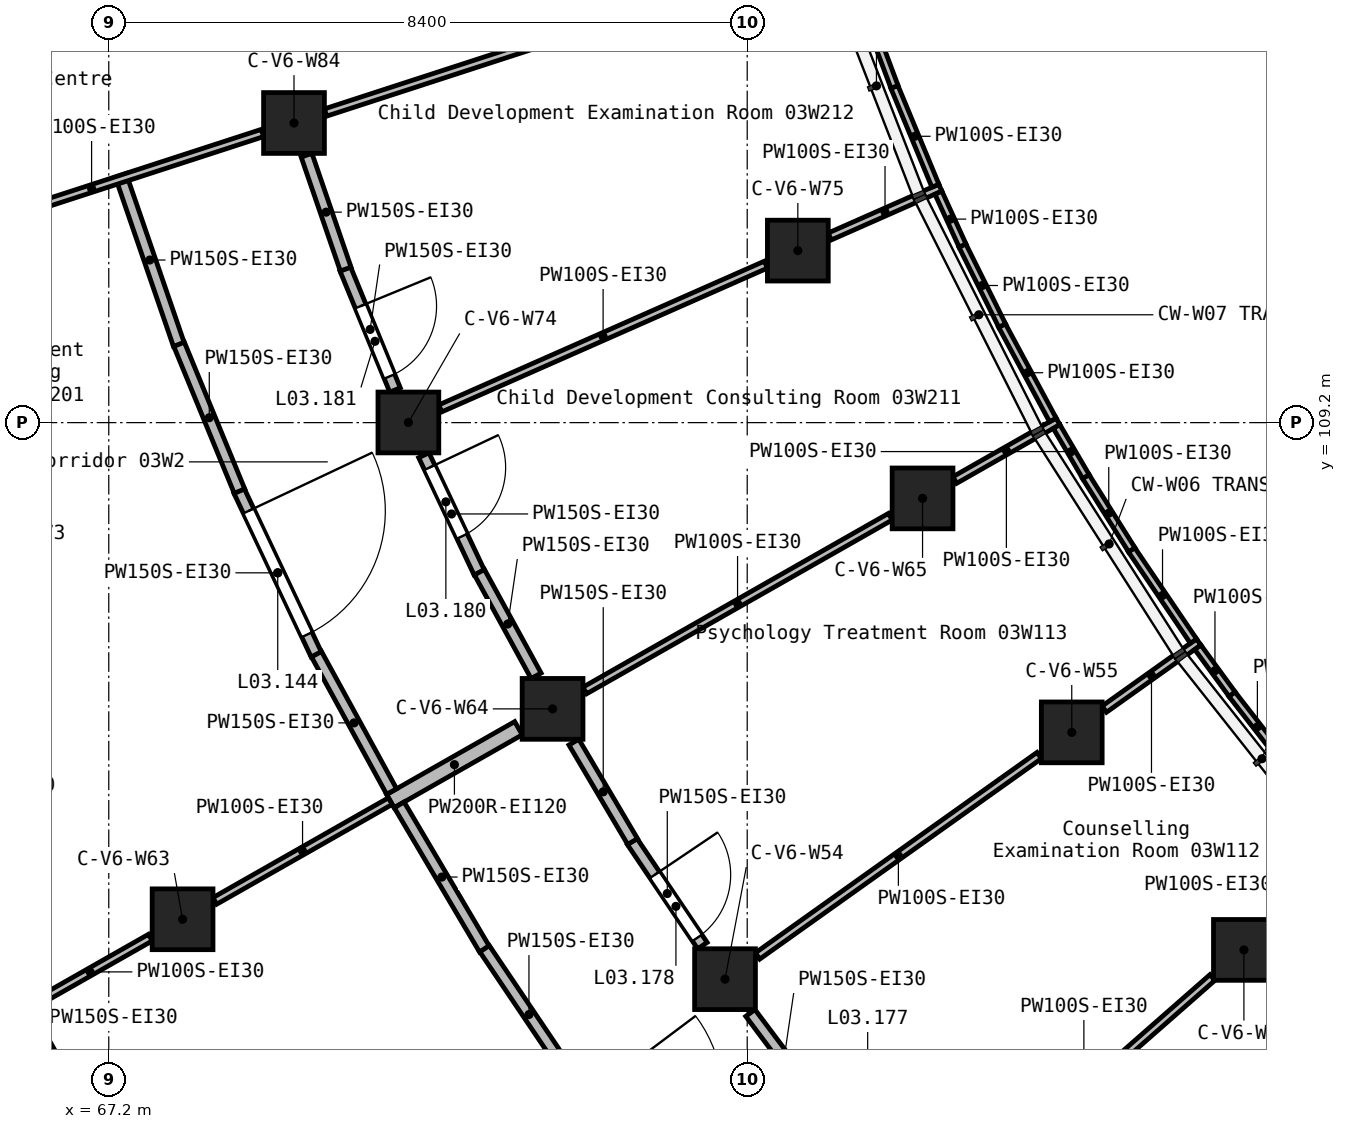
"""IFC4 building model, lengths in metres.
Left out: names, types, materials, properties, quantities, classifications, styles, units other than length and angle.
Written with IfcOpenShell. Run it as: python <this file> out.ifc"""

import sys

from ifc_helpers import new_model, si_unit, direction, frame, frame_2d, origin, origin_2d, place, context, subcontext, project, spatial, rectangle, extrude, element, fill, save


model = new_model("IFC4")
c1 = context("Model", 3, precision=1e-05, world=origin(), true_north=direction((0.0, 1.0)))
c2 = subcontext(c1, "Body", "Model", "MODEL_VIEW")
j1 = project(units=[si_unit("LENGTHUNIT", "METRE"), si_unit("PLANEANGLEUNIT", "RADIAN")], contexts=[c1])
p1 = place(None, origin())
s1 = spatial("IfcSite", under=j1, at=p1, CompositionType="ELEMENT")
p2 = place(p1, origin())
s2 = spatial("IfcBuilding", under=s1, at=p2, CompositionType="ELEMENT")
p3 = place(p2, frame((0.0, 0.0, 16.8)))
s3 = spatial("IfcBuildingStorey", under=s2, at=p3, CompositionType="ELEMENT", Elevation=16.8)
for number, where, z_axis, x_axis in (
    (1, (68.171, 102.666, 0.0), (0.0, 0.0, 1.0), (1.0, 0.0, 0.0)),
    (2, (69.637, 113.142, 0.0), (0.0, 0.0, 1.0), (1.0, 0.0, 0.0)),
    (3, (71.142, 109.202, 0.0), (0.0, 0.0, 1.0), (1.0, 0.0, 0.0)),
    (4, (73.039, 105.434, 0.0), (0.0, 0.0, 1.0), (1.0, 0.0, 0.0)),
    (5, (75.308, 101.878, 0.0), (0.0, 0.0, 1.0), (1.0, 0.0, 0.0)),
    (6, (76.266, 111.463, 0.0), (0.0, 0.0, 1.0), (1.0, 0.0, 0.0)),
    (7, (77.907, 108.203, 0.0), (0.0, 0.0, 1.0), (1.0, 0.0, 0.0)),
    (8, (79.87, 105.125, 0.0), (0.0, 0.0, 1.0), (1.0, 0.0, 0.0)),
    (9, (82.135, 102.263, 0.0), (0.0, 0.0, 1.0), (1.0, 0.0, 0.0)),
):
    element("IfcColumn", number, at=place(p3, frame(where, z_axis=z_axis, x_axis=x_axis)), inside=s3, PredefinedType="COLUMN", context=c2, shape_type="SweptSolid", body=[
        extrude(rectangle(XDim=0.8, YDim=0.8, at=origin_2d()), origin(), (0.0, 0.0, 1.0), 4.2),
    ])
p4 = place(p3, frame((70.905, 104.221, 0.0), z_axis=(0.0, 0.0, 1.0), x_axis=(0.869256176146, 0.494361912198, 0.0)))
e10 = element("IfcWall", 10, at=p4, inside=s3, PredefinedType="SOLIDWALL", context=c2, shape_type="SweptSolid", body=[
    extrude(rectangle(XDim=1.939, YDim=0.2, at=frame_2d((0.97, 0.0))), origin(), (0.0, 0.0, 1.0), 3.9),
])
p5 = place(p3, frame((68.915, 108.301, 0.0), z_axis=(0.0, 0.0, 1.0), x_axis=(0.426631335289, -0.904425620905, 0.0)))
e11 = element("IfcWall", 11, at=p5, inside=s3, PredefinedType="PARTITIONING", context=c2, shape_type="SweptSolid", body=[
    extrude(rectangle(XDim=2.381, YDim=0.15, at=frame_2d((1.19, 0.0))), origin(), (0.0, 0.0, 1.0), 3.9),
])
p6 = place(p5, frame((0.291, 0.0, 0.0)))
e12 = element("IfcOpeningElement", 12, at=p6, cuts=e11, PredefinedType="OPENING", context=c2, shape_type="SweptSolid", body=[
    extrude(rectangle(XDim=1.8, YDim=2.1, at=frame_2d((0.9, 1.05))), frame((0.0, 0.085, 0.0), z_axis=(0.0, -1.0, 0.0), x_axis=(1.0, 0.0, 0.0)), (0.0, 0.0, 1.0), 0.17),
])
p7 = place(p3, frame((71.021, 104.171, 0.0), z_axis=(0.0, 0.0, 1.0), x_axis=(0.50873677225, -0.860922119916, 0.0)))
e13 = element("IfcWall", 13, at=p7, inside=s3, PredefinedType="PARTITIONING", context=c2, shape_type="SweptSolid", body=[
    extrude(rectangle(XDim=2.205, YDim=0.15, at=frame_2d((1.103, 0.0))), origin(), (0.0, 0.0, 1.0), 3.9),
])
p8 = place(p3, frame((67.357, 112.453, 0.0), z_axis=(0.0, 0.0, 1.0), x_axis=(0.32494944972, -0.94573138635, 0.0)))
e14 = element("IfcWall", 14, at=p8, inside=s3, PredefinedType="PARTITIONING", context=c2, shape_type="SweptSolid", body=[
    extrude(rectangle(XDim=2.356, YDim=0.15, at=frame_2d((1.178, 0.0))), origin(), (0.0, 0.0, 1.0), 3.9),
])
p9 = place(p3, frame((72.145, 102.278, 0.0), z_axis=(0.0, 0.0, 1.0), x_axis=(0.558900636953, -0.829234633873, 0.0)))
e15 = element("IfcWall", 15, at=p9, inside=s3, PredefinedType="PARTITIONING", context=c2, shape_type="SweptSolid", body=[
    extrude(rectangle(XDim=2.089, YDim=0.15, at=frame_2d((1.044, 0.0))), origin(), (0.0, 0.0, 1.0), 3.9),
])
p10 = place(p3, frame((69.933, 106.153, 0.0), z_axis=(0.0, 0.0, 1.0), x_axis=(0.479964929401, -0.877287676047, 0.0)))
e16 = element("IfcWall", 16, at=p10, inside=s3, PredefinedType="PARTITIONING", context=c2, shape_type="SweptSolid", body=[
    extrude(rectangle(XDim=2.059, YDim=0.15, at=frame_2d((1.03, 0.0))), origin(), (0.0, 0.0, 1.0), 3.9),
])
p11 = place(p3, frame((68.125, 110.231, 0.0), z_axis=(0.0, 0.0, 1.0), x_axis=(0.38056168262, -0.924755538357, 0.0)))
e17 = element("IfcWall", 17, at=p11, inside=s3, PredefinedType="PARTITIONING", context=c2, shape_type="SweptSolid", body=[
    extrude(rectangle(XDim=2.089, YDim=0.15, at=frame_2d((1.044, 0.0))), origin(), (0.0, 0.0, 1.0), 3.9),
])
p12 = place(p3, frame((74.086, 103.69, 0.0), z_axis=(0.0, 0.0, 1.0), x_axis=(0.558985889655, -0.829177167538, 0.0)))
e18 = element("IfcWall", 18, at=p12, inside=s3, PredefinedType="PARTITIONING", context=c2, shape_type="SweptSolid", body=[
    extrude(rectangle(XDim=1.654, YDim=0.15, at=frame_2d((0.827, 0.0))), origin(), (0.0, 0.0, 1.0), 3.9),
])
p13 = place(p12, frame((0.53, 0.0, 0.0)))
e19 = element("IfcOpeningElement", 19, at=p13, cuts=e18, PredefinedType="OPENING", context=c2, shape_type="SweptSolid", body=[
    extrude(rectangle(XDim=1.0, YDim=2.1, at=frame_2d((0.5, 1.05))), frame((0.0, 0.085, 0.0), z_axis=(0.0, -1.0, 0.0), x_axis=(1.0, 0.0, 0.0)), (0.0, 0.0, 1.0), 0.17),
])
p14 = place(p3, frame((71.346, 108.771, 0.0), z_axis=(0.0, 0.0, 1.0), x_axis=(0.42702903496, -0.904237912997, 0.0)))
e20 = element("IfcWall", 20, at=p14, inside=s3, PredefinedType="PARTITIONING", context=c2, shape_type="SweptSolid", body=[
    extrude(rectangle(XDim=1.708, YDim=0.15, at=frame_2d((0.854, 0.0))), origin(), (0.0, 0.0, 1.0), 3.9),
])
p15 = place(p14, frame((0.178, 0.0, 0.0)))
e21 = element("IfcOpeningElement", 21, at=p15, cuts=e20, PredefinedType="OPENING", context=c2, shape_type="SweptSolid", body=[
    extrude(rectangle(XDim=1.0, YDim=2.1, at=frame_2d((0.5, 1.05))), frame((0.0, 0.085, 0.0), z_axis=(0.0, -1.0, 0.0), x_axis=(1.0, 0.0, 0.0)), (0.0, 0.0, 1.0), 0.17),
])
p16 = place(p3, frame((70.312, 111.222, 0.0), z_axis=(0.0, 0.0, 1.0), x_axis=(0.380150665177, -0.924924576258, 0.0)))
e22 = element("IfcWall", 22, at=p16, inside=s3, PredefinedType="PARTITIONING", context=c2, shape_type="SweptSolid", body=[
    extrude(rectangle(XDim=1.722, YDim=0.15, at=frame_2d((0.861, 0.0))), origin(), (0.0, 0.0, 1.0), 3.9),
])
p17 = place(p16, frame((0.53, 0.0, 0.0)))
e23 = element("IfcOpeningElement", 23, at=p17, cuts=e22, PredefinedType="OPENING", context=c2, shape_type="SweptSolid", body=[
    extrude(rectangle(XDim=1.0, YDim=2.1, at=frame_2d((0.5, 1.05))), frame((0.0, 0.085, 0.0), z_axis=(0.0, -1.0, 0.0), x_axis=(1.0, 0.0, 0.0)), (0.0, 0.0, 1.0), 0.17),
])
p18 = place(p3, frame((73.319, 104.997, 0.0), z_axis=(0.0, 0.0, 1.0), x_axis=(0.508740142918, -0.86092012811, 0.0)))
e24 = element("IfcWall", 24, at=p18, inside=s3, PredefinedType="PARTITIONING", context=c2, shape_type="SweptSolid", body=[
    extrude(rectangle(XDim=1.519, YDim=0.15, at=frame_2d((0.759, 0.0))), origin(), (0.0, 0.0, 1.0), 3.9),
])
p19 = place(p3, frame((75.641, 101.434, 0.0), z_axis=(0.0, 0.0, 1.0), x_axis=(0.60023710435, -0.799822116825, 0.0)))
e25 = element("IfcWall", 25, at=p19, inside=s3, PredefinedType="PARTITIONING", context=c2, shape_type="SweptSolid", body=[
    extrude(rectangle(XDim=1.483, YDim=0.15, at=frame_2d((0.741, 0.0))), origin(), (0.0, 0.0, 1.0), 3.9),
])
p20 = place(p3, frame((72.077, 107.232, 0.0), z_axis=(0.0, 0.0, 1.0), x_axis=(0.480041086357, -0.877246006209, 0.0)))
e26 = element("IfcWall", 26, at=p20, inside=s3, PredefinedType="PARTITIONING", context=c2, shape_type="SweptSolid", body=[
    extrude(rectangle(XDim=1.553, YDim=0.15, at=frame_2d((0.777, 0.0))), origin(), (0.0, 0.0, 1.0), 3.9),
])
p21 = place(p3, frame((69.802, 112.718, 0.0), z_axis=(0.0, 0.0, 1.0), x_axis=(0.32490745983, -0.945745812863, 0.0)))
e27 = element("IfcWall", 27, at=p21, inside=s3, PredefinedType="PARTITIONING", context=c2, shape_type="SweptSolid", body=[
    extrude(rectangle(XDim=1.584, YDim=0.15, at=frame_2d((0.792, 0.0))), origin(), (0.0, 0.0, 1.0), 3.9),
])
p22 = place(p3, frame((65.655, 102.257, 0.0), z_axis=(0.0, 0.0, 1.0), x_axis=(0.495741714706, -0.868470006564, 0.0)))
e28 = element("IfcWall", 28, at=p22, inside=s3, PredefinedType="PARTITIONING", context=c2, shape_type="SweptSolid", body=[
    extrude(rectangle(XDim=2.052, YDim=0.15, at=frame_2d((1.026, 0.0))), origin(), (0.0, 0.0, 1.0), 3.9),
])
p23 = place(p3, frame((64.726, 111.55, 0.0), z_axis=(0.0, 0.0, 1.0), x_axis=(0.951062529891, 0.308998485818, 0.0)))
e29 = element("IfcWall", 29, at=p23, inside=s3, PredefinedType="PARTITIONING", context=c2, shape_type="SweptSolid", body=[
    extrude(rectangle(XDim=4.727, YDim=0.1, at=frame_2d((2.364, 0.0))), origin(), (0.0, 0.0, 1.0), 3.9),
])
p24 = place(p3, frame((70.052, 113.28, 0.0), z_axis=(0.0, 0.0, 1.0), x_axis=(0.951069136727, 0.308978149982, 0.0)))
e30 = element("IfcWall", 30, at=p24, inside=s3, PredefinedType="PARTITIONING", context=c2, shape_type="SweptSolid", body=[
    extrude(rectangle(XDim=7.213, YDim=0.1, at=frame_2d((3.606, 0.0))), origin(), (0.0, 0.0, 1.0), 3.9),
])
p25 = place(p3, frame((71.562, 109.387, 0.0), z_axis=(0.0, 0.0, 1.0), x_axis=(0.914844742968, 0.403805765515, 0.0)))
e31 = element("IfcWall", 31, at=p25, inside=s3, PredefinedType="PARTITIONING", context=c2, shape_type="SweptSolid", body=[
    extrude(rectangle(XDim=4.683, YDim=0.1, at=frame_2d((2.342, 0.0))), origin(), (0.0, 0.0, 1.0), 3.9),
])
p26 = place(p3, frame((76.686, 111.649, 0.0), z_axis=(0.0, 0.0, 1.0), x_axis=(0.914802710669, 0.403900978649, 0.0)))
e32 = element("IfcWall", 32, at=p26, inside=s3, PredefinedType="PARTITIONING", context=c2, shape_type="SweptSolid", body=[
    extrude(rectangle(XDim=1.59, YDim=0.1, at=frame_2d((0.795, 0.0))), origin(), (0.0, 0.0, 1.0), 3.9),
])
p27 = place(p3, frame((78.338, 98.933, 0.0), z_axis=(0.0, 0.0, 1.0), x_axis=(0.751823288541, 0.659364650863, 0.0)))
e33 = element("IfcWall", 33, at=p27, inside=s3, PredefinedType="PARTITIONING", context=c2, shape_type="SweptSolid", body=[
    extrude(rectangle(XDim=4.5, YDim=0.1, at=frame_2d((2.25, 0.0))), origin(), (0.0, 0.0, 1.0), 3.9),
])
p28 = place(p3, frame((75.736, 102.183, 0.0), z_axis=(0.0, 0.0, 1.0), x_axis=(0.8147152487, 0.579861245072, 0.0)))
e34 = element("IfcWall", 34, at=p28, inside=s3, PredefinedType="PARTITIONING", context=c2, shape_type="SweptSolid", body=[
    extrude(rectangle(XDim=4.548, YDim=0.1, at=frame_2d((2.274, 0.0))), origin(), (0.0, 0.0, 1.0), 3.9),
])
p29 = place(p3, frame((80.298, 105.43, 0.0), z_axis=(0.0, 0.0, 1.0), x_axis=(0.814728250396, 0.579842977027, 0.0)))
e35 = element("IfcWall", 35, at=p29, inside=s3, PredefinedType="PARTITIONING", context=c2, shape_type="SweptSolid", body=[
    extrude(rectangle(XDim=1.524, YDim=0.1, at=frame_2d((0.762, 0.0))), origin(), (0.0, 0.0, 1.0), 3.9),
])
p30 = place(p3, frame((73.463, 105.676, 0.0), z_axis=(0.0, 0.0, 1.0), x_axis=(0.8692549769, 0.494364020874, 0.0)))
e36 = element("IfcWall", 36, at=p30, inside=s3, PredefinedType="PARTITIONING", context=c2, shape_type="SweptSolid", body=[
    extrude(rectangle(XDim=4.625, YDim=0.1, at=frame_2d((2.312, 0.0))), origin(), (0.0, 0.0, 1.0), 3.9),
])
p31 = place(p3, frame((78.331, 108.445, 0.0), z_axis=(0.0, 0.0, 1.0), x_axis=(0.869222922884, 0.494420378154, 0.0)))
e37 = element("IfcWall", 37, at=p31, inside=s3, PredefinedType="PARTITIONING", context=c2, shape_type="SweptSolid", body=[
    extrude(rectangle(XDim=1.561, YDim=0.1, at=frame_2d((0.781, 0.0))), origin(), (0.0, 0.0, 1.0), 3.9),
])
p32 = place(p3, frame((66.16, 101.523, 0.0), z_axis=(0.0, 0.0, 1.0), x_axis=(0.869286737545, 0.494308171011, 0.0)))
e38 = element("IfcWall", 38, at=p32, inside=s3, PredefinedType="PARTITIONING", context=c2, shape_type="SweptSolid", body=[
    extrude(rectangle(XDim=1.825, YDim=0.1, at=frame_2d((0.913, 0.0))), origin(), (0.0, 0.0, 1.0), 3.9),
])
p33 = place(p3, frame((68.595, 102.907, 0.0), z_axis=(0.0, 0.0, 1.0), x_axis=(0.869270757215, 0.494336272846, 0.0)))
e39 = element("IfcWall", 39, at=p33, inside=s3, PredefinedType="PARTITIONING", context=c2, shape_type="SweptSolid", body=[
    extrude(rectangle(XDim=2.656, YDim=0.1, at=frame_2d((1.328, 0.0))), origin(), (0.0, 0.0, 1.0), 3.9),
])
p34 = place(p3, frame((80.657, 107.527, 0.0), z_axis=(0.0, 0.0, 1.0), x_axis=(0.561086061718, -0.827757471332, 0.0)))
e40 = element("IfcWall", 40, at=p34, inside=s3, PredefinedType="PARTITIONING", context=c2, shape_type="SweptSolid", body=[
    extrude(rectangle(XDim=1.452, YDim=0.1, at=frame_2d((0.726, 0.0))), origin(), (0.0, 0.0, 1.0), 3.9),
])
p35 = place(p3, frame((78.952, 110.478, 0.0), z_axis=(0.0, 0.0, 1.0), x_axis=(0.474192635092, -0.880421117889, 0.0)))
e41 = element("IfcWall", 41, at=p35, inside=s3, PredefinedType="PARTITIONING", context=c2, shape_type="SweptSolid", body=[
    extrude(rectangle(XDim=1.412, YDim=0.1, at=frame_2d((0.706, 0.0))), origin(), (0.0, 0.0, 1.0), 3.9),
])
p36 = place(p3, frame((77.536, 113.618, 0.0), z_axis=(0.0, 0.0, 1.0), x_axis=(0.383274532271, -0.923634469318, 0.0)))
e42 = element("IfcWall", 42, at=p36, inside=s3, PredefinedType="PARTITIONING", context=c2, shape_type="SweptSolid", body=[
    extrude(rectangle(XDim=1.41, YDim=0.1, at=frame_2d((0.705, 0.0))), origin(), (0.0, 0.0, 1.0), 3.9),
])
p37 = place(p3, frame((77.132, 114.701, 0.0), z_axis=(0.0, 0.0, 1.0), x_axis=(0.350822880831, -0.936441832836, 0.0)))
e43 = element("IfcWall", 43, at=p37, inside=s3, PredefinedType="PARTITIONING", context=c2, shape_type="SweptSolid", body=[
    extrude(rectangle(XDim=1.157, YDim=0.1, at=frame_2d((0.579, 0.0))), origin(), (0.0, 0.0, 1.0), 3.9),
])
p38 = place(p3, frame((78.431, 111.531, 0.0), z_axis=(0.0, 0.0, 1.0), x_axis=(0.445137160255, -0.8954623993, 0.0)))
e44 = element("IfcWall", 44, at=p38, inside=s3, PredefinedType="PARTITIONING", context=c2, shape_type="SweptSolid", body=[
    extrude(rectangle(XDim=1.177, YDim=0.1, at=frame_2d((0.588, 0.0))), origin(), (0.0, 0.0, 1.0), 3.9),
])
p39 = place(p3, frame((80.054, 108.49, 0.0), z_axis=(0.0, 0.0, 1.0), x_axis=(0.531657145883, -0.846959668008, 0.0)))
e45 = element("IfcWall", 45, at=p39, inside=s3, PredefinedType="PARTITIONING", context=c2, shape_type="SweptSolid", body=[
    extrude(rectangle(XDim=1.137, YDim=0.1, at=frame_2d((0.569, 0.0))), origin(), (0.0, 0.0, 1.0), 3.9),
])
p40 = place(p3, frame((81.977, 105.628, 0.0), z_axis=(0.0, 0.0, 1.0), x_axis=(0.61437453726, -0.78901452963, 0.0)))
e46 = element("IfcWall", 46, at=p40, inside=s3, PredefinedType="PARTITIONING", context=c2, shape_type="SweptSolid", body=[
    extrude(rectangle(XDim=1.09, YDim=0.1, at=frame_2d((0.545, 0.0))), origin(), (0.0, 0.0, 1.0), 3.9),
])
p41 = place(p3, frame((78.116, 112.225, 0.0), z_axis=(0.0, 0.0, 1.0), x_axis=(0.414838086324, -0.909895247891, 0.0)))
e47 = element("IfcWall", 47, at=p41, inside=s3, PredefinedType="PARTITIONING", context=c2, shape_type="SweptSolid", body=[
    extrude(rectangle(XDim=0.764, YDim=0.1, at=frame_2d((0.382, 0.0))), origin(), (0.0, 0.0, 1.0), 3.9),
])
p42 = place(p3, frame((79.671, 109.148, 0.0), z_axis=(0.0, 0.0, 1.0), x_axis=(0.505620943658, -0.862755736773, 0.0)))
e48 = element("IfcWall", 48, at=p42, inside=s3, PredefinedType="PARTITIONING", context=c2, shape_type="SweptSolid", body=[
    extrude(rectangle(XDim=0.763, YDim=0.1, at=frame_2d((0.381, 0.0))), origin(), (0.0, 0.0, 1.0), 3.9),
])
p43 = place(p3, frame((81.529, 106.244, 0.0), z_axis=(0.0, 0.0, 1.0), x_axis=(0.590281268128, -0.807197636578, 0.0)))
e49 = element("IfcWall", 49, at=p43, inside=s3, PredefinedType="PARTITIONING", context=c2, shape_type="SweptSolid", body=[
    extrude(rectangle(XDim=0.763, YDim=0.1, at=frame_2d((0.382, 0.0))), origin(), (0.0, 0.0, 1.0), 3.9),
])
p44 = place(p6, origin())
e50 = element("IfcDoor", 50, at=p44, inside=s3, OperationType="DOUBLE_DOOR_SINGLE_SWING", PredefinedType="DOOR", context=c2, shape_type="SweptSolid", body=[
    extrude(rectangle(XDim=1.8, YDim=2.1, at=frame_2d((0.9, 1.05))), frame((0.0, 0.025, 0.0), z_axis=(0.0, -1.0, 0.0), x_axis=(1.0, 0.0, 0.0)), (0.0, 0.0, 1.0), 0.05),
])
fill(e12, e50)
p45 = place(p13, origin())
e51 = element("IfcDoor", 51, at=p45, inside=s3, OperationType="SINGLE_SWING_RIGHT", PredefinedType="DOOR", context=c2, shape_type="SweptSolid", body=[
    extrude(rectangle(XDim=1.0, YDim=2.1, at=frame_2d((0.5, 1.05))), frame((0.0, 0.025, 0.0), z_axis=(0.0, -1.0, 0.0), x_axis=(1.0, 0.0, 0.0)), (0.0, 0.0, 1.0), 0.05),
])
fill(e19, e51)
p46 = place(p15, origin())
e52 = element("IfcDoor", 52, at=p46, inside=s3, OperationType="SINGLE_SWING_LEFT", PredefinedType="DOOR", context=c2, shape_type="SweptSolid", body=[
    extrude(rectangle(XDim=1.0, YDim=2.1, at=frame_2d((0.5, 1.05))), frame((0.0, 0.025, 0.0), z_axis=(0.0, -1.0, 0.0), x_axis=(1.0, 0.0, 0.0)), (0.0, 0.0, 1.0), 0.05),
])
fill(e21, e52)
p47 = place(p17, origin())
e53 = element("IfcDoor", 53, at=p47, inside=s3, OperationType="SINGLE_SWING_RIGHT", PredefinedType="DOOR", context=c2, shape_type="SweptSolid", body=[
    extrude(rectangle(XDim=1.0, YDim=2.1, at=frame_2d((0.5, 1.05))), frame((0.0, 0.025, 0.0), z_axis=(0.0, -1.0, 0.0), x_axis=(1.0, 0.0, 0.0)), (0.0, 0.0, 1.0), 0.05),
])
fill(e23, e53)
save(model, sys.argv[1])
